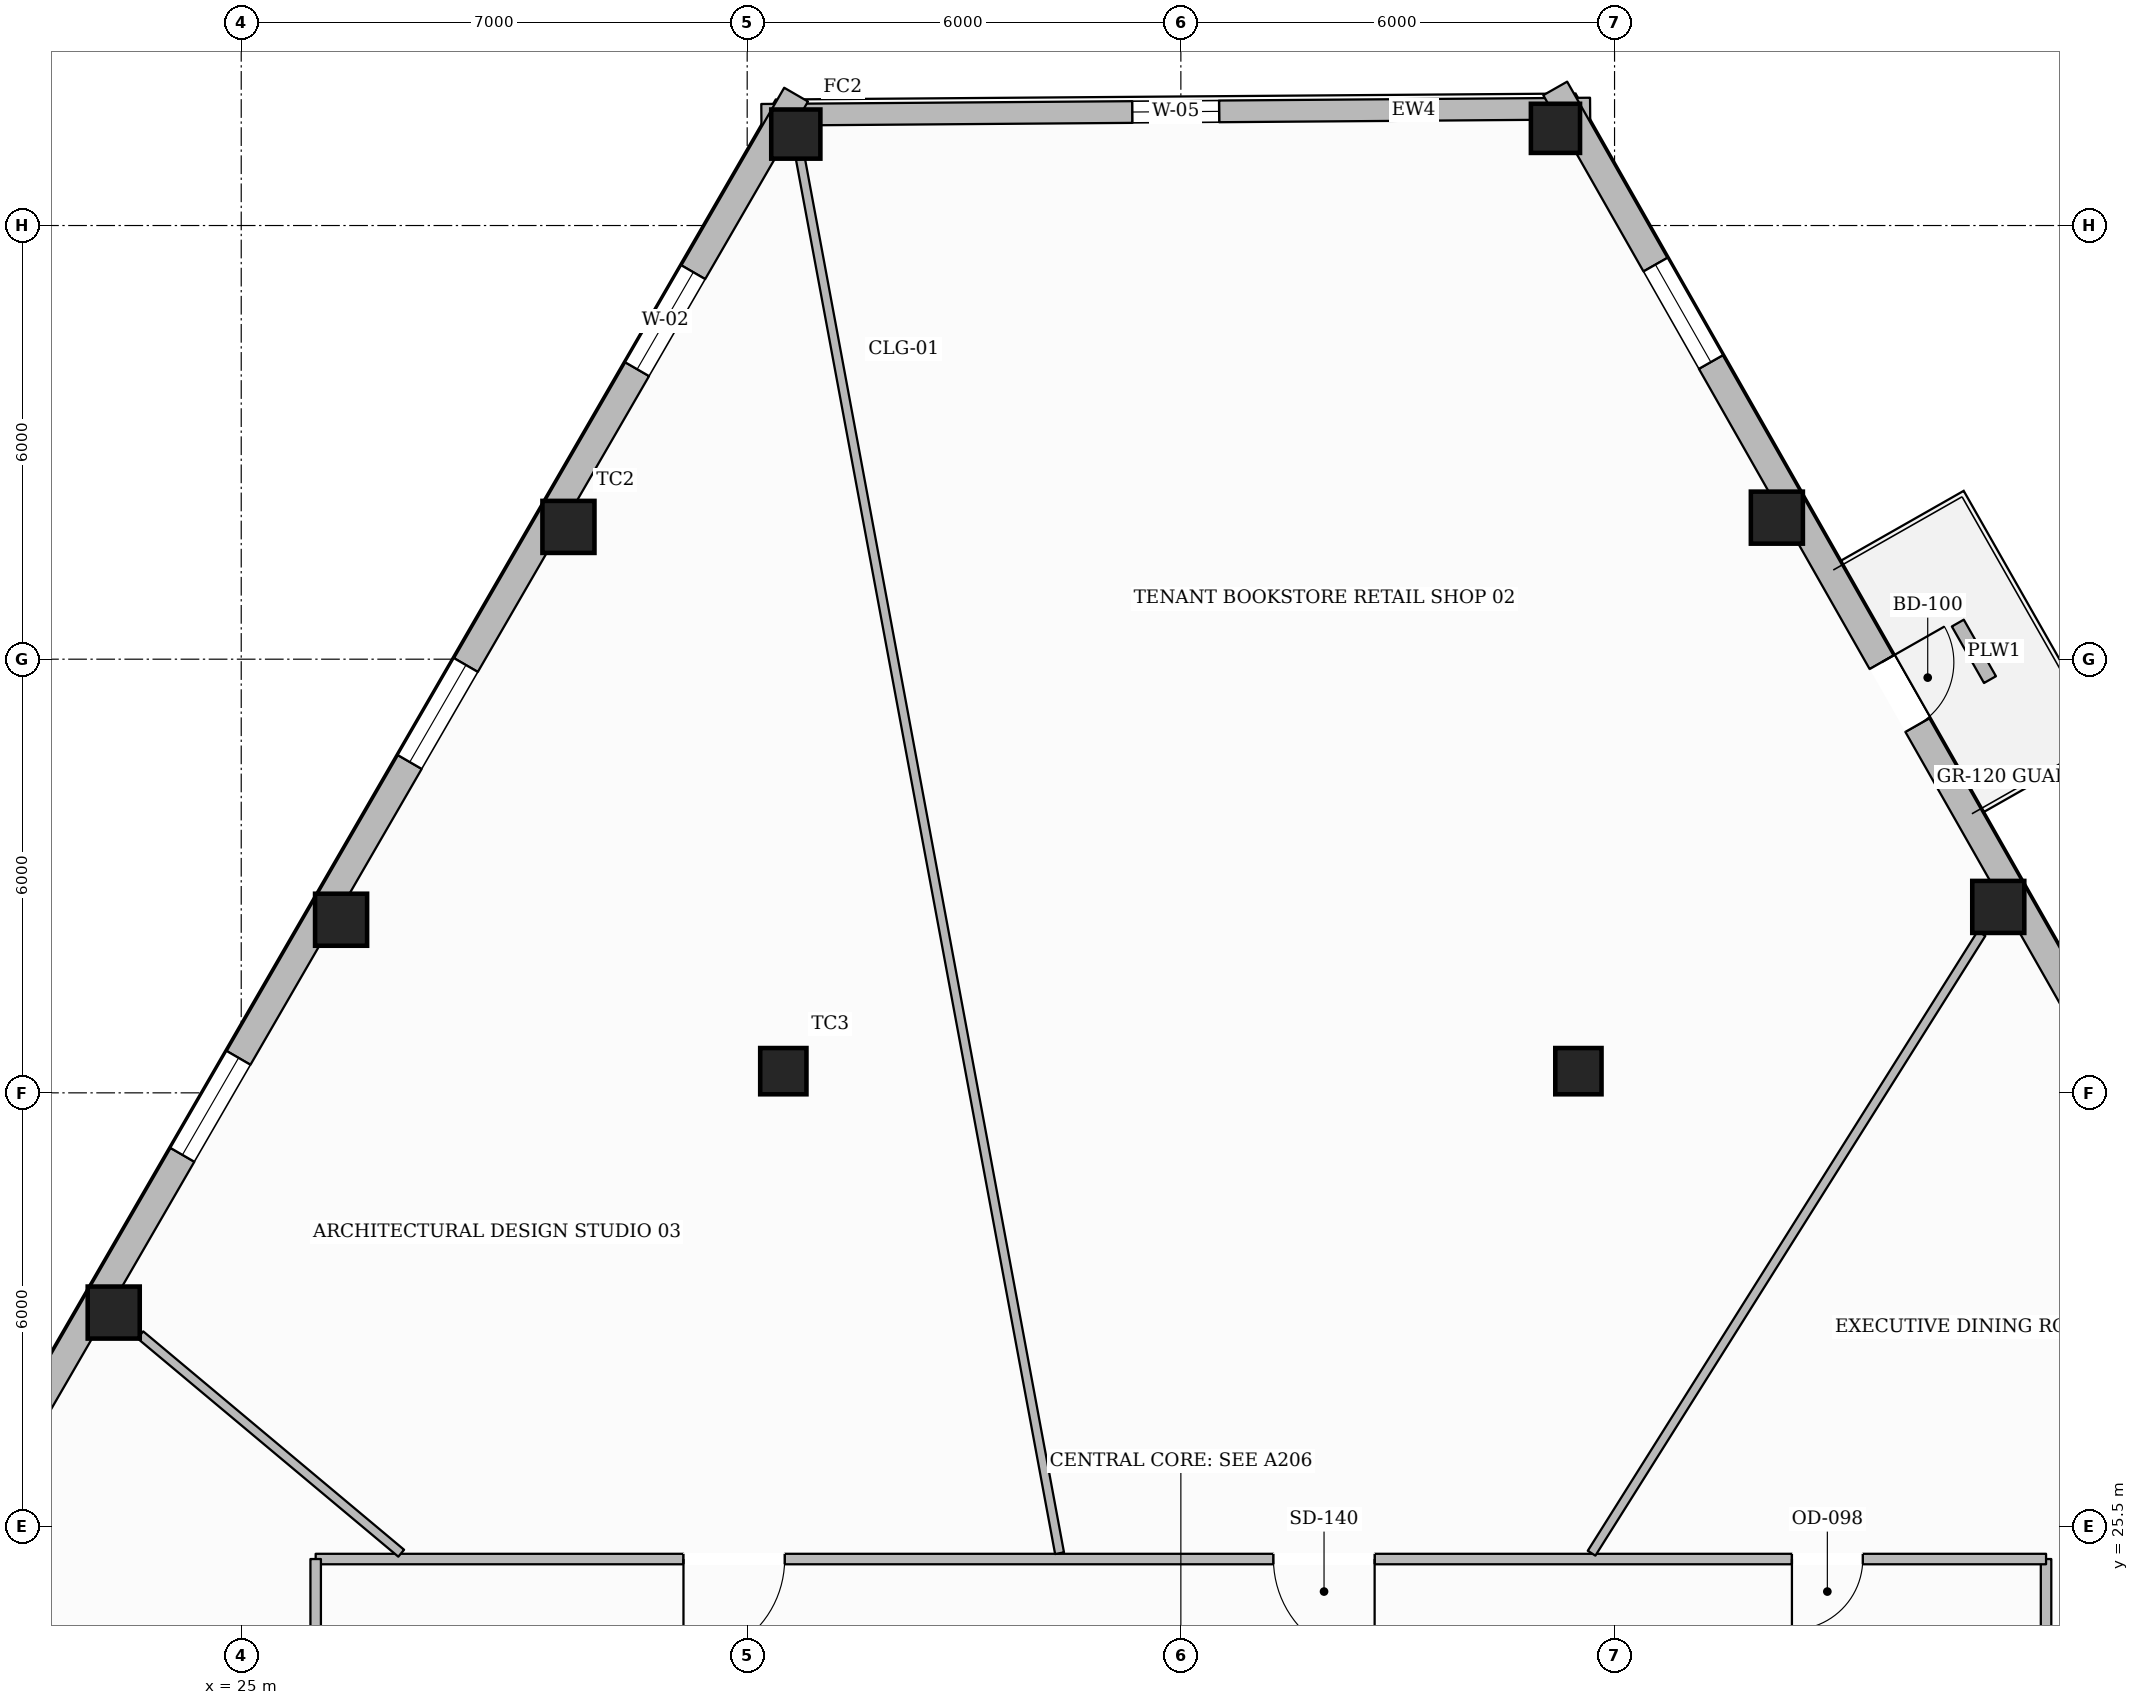
"""IFC4 building model, lengths in metres.
Left out: names, types, materials, properties, quantities, classifications, styles, units other than length and angle.
Written with IfcOpenShell. Run it as: python <this file> out.ifc"""

import sys

from ifc_helpers import new_model, si_unit, direction, frame, frame_2d, origin, origin_2d, place, context, subcontext, project, spatial, rectangle, hollow_rectangle, extrude, element, fill, save


model = new_model("IFC4")
c1 = context("Model", 3, precision=1e-05, world=origin(), true_north=direction((0.0, 1.0)))
c2 = subcontext(c1, "Body", "Model", "MODEL_VIEW")
j1 = project(units=[si_unit("LENGTHUNIT", "METRE"), si_unit("PLANEANGLEUNIT", "RADIAN")], contexts=[c1])
p1 = place(None, origin())
s1 = spatial("IfcSite", under=j1, at=p1, CompositionType="ELEMENT")
p2 = place(p1, origin())
s2 = spatial("IfcBuilding", under=s1, at=p2, CompositionType="ELEMENT")
p3 = place(p2, frame((0.0, 0.0, 150.95)))
s3 = spatial("IfcBuildingStorey", under=s2, at=p3, CompositionType="ELEMENT", Elevation=150.95)
p4 = place(p3, frame((32.673, 44.765, 0.0), z_axis=(0.0, 0.0, 1.0), x_axis=(1.0, 0.0, 0.0)))
e1 = element("IfcColumn", 1, at=p4, inside=s3, PredefinedType="COLUMN", context=c2, shape_type="SweptSolid", body=[
    extrude(hollow_rectangle(XDim=0.68, YDim=0.68, WallThickness=0.03, at=origin_2d()), origin(), (0.0, 0.0, 1.0), 3.43),
])
for number, where, z_axis, x_axis in (
    (2, (29.527, 39.33, 0.0), (0.0, 0.0, 1.0), (1.0, 0.0, 0.0)),
    (3, (26.382, 33.895, 0.0), (0.0, 0.0, 1.0), (1.0, 0.0, 0.0)),
    (4, (23.236, 28.46, 0.0), (0.0, 0.0, 1.0), (1.0, 0.0, 0.0)),
    (5, (49.309, 34.073, 0.0), (0.0, 0.0, 1.0), (1.0, 0.0, 0.0)),
    (6, (46.246, 39.458, 0.0), (0.0, 0.0, 1.0), (1.0, 0.0, 0.0)),
):
    element("IfcColumn", number, at=place(p3, frame(where, z_axis=z_axis, x_axis=x_axis)), inside=s3, PredefinedType="COLUMN", context=c2, shape_type="SweptSolid", body=[
        extrude(hollow_rectangle(XDim=0.72, YDim=0.72, WallThickness=0.032, at=origin_2d()), origin(), (0.0, 0.0, 1.0), 3.43),
    ])
p5 = place(p3, frame((43.183, 44.844, 0.0), z_axis=(0.0, 0.0, 1.0), x_axis=(1.0, 0.0, 0.0)))
e7 = element("IfcColumn", 7, at=p5, inside=s3, PredefinedType="COLUMN", context=c2, shape_type="SweptSolid", body=[
    extrude(hollow_rectangle(XDim=0.68, YDim=0.68, WallThickness=0.03, at=origin_2d()), origin(), (0.0, 0.0, 1.0), 3.43),
])
for number, where, z_axis, x_axis in (
    (8, (32.5, 31.8, 0.0), (0.0, 0.0, 1.0), (1.0, 0.0, 0.0)),
    (9, (43.5, 31.8, 0.0), (0.0, 0.0, 1.0), (1.0, 0.0, 0.0)),
):
    element("IfcColumn", number, at=place(p3, frame(where, z_axis=z_axis, x_axis=x_axis)), inside=s3, PredefinedType="COLUMN", context=c2, shape_type="SweptSolid", body=[
        extrude(hollow_rectangle(XDim=0.64, YDim=0.64, WallThickness=0.028, at=origin_2d()), origin(), (0.0, 0.0, 1.0), 3.43),
    ])
p6 = place(p3, frame((32.196, 45.031, 0.0), z_axis=(0.0, 0.0, 1.0), x_axis=(0.999971432125, 0.007558765403, 0.0)))
e10 = element("IfcWall", 10, at=p6, inside=s3, PredefinedType="STANDARD", context=c2, shape_type="SweptSolid", body=[
    extrude(rectangle(XDim=11.466, YDim=0.3, at=frame_2d((5.733, 0.0))), origin(), (0.0, 0.0, 1.0), 2.889),
])
p7 = place(p6, frame((5.133, 0.0, 0.65)))
e11 = element("IfcOpeningElement", 11, at=p7, cuts=e10, PredefinedType="OPENING", context=c2, shape_type="SweptSolid", body=[
    extrude(rectangle(XDim=1.2, YDim=1.55, at=frame_2d((0.6, 0.775))), frame((0.0, 0.16, 0.0), z_axis=(0.0, -1.0, 0.0), x_axis=(1.0, 0.0, 0.0)), (0.0, 0.0, 1.0), 0.32),
])
p8 = place(p3, frame((13.327, 11.879, 0.0), z_axis=(0.0, 0.0, 1.0), x_axis=(0.500913687278, 0.865497243148, 0.0)))
e12 = element("IfcWall", 12, at=p8, inside=s3, PredefinedType="STANDARD", context=c2, shape_type="SweptSolid", body=[
    extrude(rectangle(XDim=38.628, YDim=0.38, at=frame_2d((19.314, 0.0))), origin(), (0.0, 0.0, 1.0), 2.889),
])
p9 = place(p8, frame((9.257, 0.0, 0.0)))
e13 = element("IfcOpeningElement", 13, at=p9, cuts=e12, PredefinedType="OPENING", context=c2, shape_type="SweptSolid", body=[
    extrude(rectangle(XDim=1.0, YDim=2.2, at=frame_2d((0.5, 1.1))), frame((0.0, 0.2, 0.0), z_axis=(0.0, -1.0, 0.0), x_axis=(1.0, 0.0, 0.0)), (0.0, 0.0, 1.0), 0.4),
])
p10 = place(p8, frame((34.239, 0.0, 0.55)))
e14 = element("IfcOpeningElement", 14, at=p10, cuts=e12, PredefinedType="OPENING", context=c2, shape_type="SweptSolid", body=[
    extrude(rectangle(XDim=1.55, YDim=1.6, at=frame_2d((0.775, 0.8))), frame((0.0, 0.2, 0.0), z_axis=(0.0, -1.0, 0.0), x_axis=(1.0, 0.0, 0.0)), (0.0, 0.0, 1.0), 0.4),
])
p11 = place(p8, frame((27.959, 0.0, 0.55)))
e15 = element("IfcOpeningElement", 15, at=p11, cuts=e12, PredefinedType="OPENING", context=c2, shape_type="SweptSolid", body=[
    extrude(rectangle(XDim=1.55, YDim=1.6, at=frame_2d((0.775, 0.8))), frame((0.0, 0.2, 0.0), z_axis=(0.0, -1.0, 0.0), x_axis=(1.0, 0.0, 0.0)), (0.0, 0.0, 1.0), 0.4),
])
p12 = place(p8, frame((21.679, 0.0, 0.55)))
e16 = element("IfcOpeningElement", 16, at=p12, cuts=e12, PredefinedType="OPENING", context=c2, shape_type="SweptSolid", body=[
    extrude(rectangle(XDim=1.55, YDim=1.6, at=frame_2d((0.775, 0.8))), frame((0.0, 0.2, 0.0), z_axis=(0.0, -1.0, 0.0), x_axis=(1.0, 0.0, 0.0)), (0.0, 0.0, 1.0), 0.4),
])
p13 = place(p8, frame((2.84, 0.0, 0.55)))
e17 = element("IfcOpeningElement", 17, at=p13, cuts=e12, PredefinedType="OPENING", context=c2, shape_type="SweptSolid", body=[
    extrude(rectangle(XDim=1.55, YDim=1.6, at=frame_2d((0.775, 0.8))), frame((0.0, 0.2, 0.0), z_axis=(0.0, -1.0, 0.0), x_axis=(1.0, 0.0, 0.0)), (0.0, 0.0, 1.0), 0.4),
])
p14 = place(p3, frame((43.179, 45.396, 0.0), z_axis=(0.0, 0.0, 1.0), x_axis=(0.494363218784, -0.869255433065, 0.0)))
e18 = element("IfcWall", 18, at=p14, inside=s3, PredefinedType="STANDARD", context=c2, shape_type="SweptSolid", body=[
    extrude(rectangle(XDim=38.134, YDim=0.38, at=frame_2d((19.067, 0.0))), origin(), (0.0, 0.0, 1.0), 2.889),
])
p15 = place(p14, frame((9.134, 0.0, 0.0)))
e19 = element("IfcOpeningElement", 19, at=p15, cuts=e18, PredefinedType="OPENING", context=c2, shape_type="SweptSolid", body=[
    extrude(rectangle(XDim=1.0, YDim=2.2, at=frame_2d((0.5, 1.1))), frame((0.0, 0.2, 0.0), z_axis=(0.0, -1.0, 0.0), x_axis=(1.0, 0.0, 0.0)), (0.0, 0.0, 1.0), 0.4),
])
p16 = place(p14, frame((33.785, 0.0, 0.55)))
e20 = element("IfcOpeningElement", 20, at=p16, cuts=e18, PredefinedType="OPENING", context=c2, shape_type="SweptSolid", body=[
    extrude(rectangle(XDim=1.55, YDim=1.6, at=frame_2d((0.775, 0.8))), frame((0.0, 0.2, 0.0), z_axis=(0.0, -1.0, 0.0), x_axis=(1.0, 0.0, 0.0)), (0.0, 0.0, 1.0), 0.4),
])
p17 = place(p14, frame((27.589, 0.0, 0.55)))
e21 = element("IfcOpeningElement", 21, at=p17, cuts=e18, PredefinedType="OPENING", context=c2, shape_type="SweptSolid", body=[
    extrude(rectangle(XDim=1.55, YDim=1.6, at=frame_2d((0.775, 0.8))), frame((0.0, 0.2, 0.0), z_axis=(0.0, -1.0, 0.0), x_axis=(1.0, 0.0, 0.0)), (0.0, 0.0, 1.0), 0.4),
])
p18 = place(p14, frame((21.393, 0.0, 0.55)))
e22 = element("IfcOpeningElement", 22, at=p18, cuts=e18, PredefinedType="OPENING", context=c2, shape_type="SweptSolid", body=[
    extrude(rectangle(XDim=1.55, YDim=1.6, at=frame_2d((0.775, 0.8))), frame((0.0, 0.2, 0.0), z_axis=(0.0, -1.0, 0.0), x_axis=(1.0, 0.0, 0.0)), (0.0, 0.0, 1.0), 0.4),
])
p19 = place(p14, frame((2.805, 0.0, 0.55)))
e23 = element("IfcOpeningElement", 23, at=p19, cuts=e18, PredefinedType="OPENING", context=c2, shape_type="SweptSolid", body=[
    extrude(rectangle(XDim=1.55, YDim=1.6, at=frame_2d((0.775, 0.8))), frame((0.0, 0.2, 0.0), z_axis=(0.0, -1.0, 0.0), x_axis=(1.0, 0.0, 0.0)), (0.0, 0.0, 1.0), 0.4),
])
p20 = place(p3, frame((49.194, 37.217, 0.0), z_axis=(0.0, 0.0, 1.0), x_axis=(-0.494209783785, 0.869342676746, 0.0)))
e24 = element("IfcWall", 24, at=p20, inside=s3, PredefinedType="USERDEFINED", context=c2, shape_type="SweptSolid", body=[
    extrude(rectangle(XDim=0.9, YDim=0.19, at=frame_2d((0.45, 0.0))), origin(), (0.0, 0.0, 1.0), 0.5),
])
p21 = place(p3, frame((49.97, 7.15, 0.0), z_axis=(0.0, 0.0, 1.0), x_axis=(0.0, 1.0, 0.0)))
e25 = element("IfcWall", 25, at=p21, inside=s3, PredefinedType="PARTITIONING", context=c2, shape_type="SweptSolid", body=[
    extrude(rectangle(XDim=17.9, YDim=0.145, at=frame_2d((8.95, 0.0))), origin(), (0.0, 0.0, 1.0), 3.118),
])
p22 = place(p21, frame((8.246, 0.0, 0.0)))
e26 = element("IfcOpeningElement", 26, at=p22, cuts=e25, PredefinedType="OPENING", context=c2, shape_type="SweptSolid", body=[
    extrude(rectangle(XDim=1.02, YDim=2.15, at=frame_2d((0.51, 1.075))), frame((0.0, 0.083, 0.0), z_axis=(0.0, -1.0, 0.0), x_axis=(1.0, 0.0, 0.0)), (0.0, 0.0, 1.0), 0.165),
])
p23 = place(p3, frame((49.97, 25.05, 0.0), z_axis=(0.0, 0.0, 1.0), x_axis=(-1.0, 0.0, 0.0)))
e27 = element("IfcWall", 27, at=p23, inside=s3, PredefinedType="PARTITIONING", context=c2, shape_type="SweptSolid", body=[
    extrude(rectangle(XDim=23.94, YDim=0.145, at=frame_2d((11.97, 0.0))), origin(), (0.0, 0.0, 1.0), 3.43),
])
p24 = place(p23, frame((2.536, 0.0, 0.0)))
e28 = element("IfcOpeningElement", 28, at=p24, cuts=e27, PredefinedType="OPENING", context=c2, shape_type="SweptSolid", body=[
    extrude(rectangle(XDim=0.98, YDim=2.15, at=frame_2d((0.49, 1.075))), frame((0.0, 0.083, 0.0), z_axis=(0.0, -1.0, 0.0), x_axis=(1.0, 0.0, 0.0)), (0.0, 0.0, 1.0), 0.165),
])
p25 = place(p23, frame((9.289, 0.0, 0.0)))
e29 = element("IfcOpeningElement", 29, at=p25, cuts=e27, PredefinedType="OPENING", context=c2, shape_type="SweptSolid", body=[
    extrude(rectangle(XDim=1.4, YDim=2.2, at=frame_2d((0.7, 1.1))), frame((0.0, 0.083, 0.0), z_axis=(0.0, -1.0, 0.0), x_axis=(1.0, 0.0, 0.0)), (0.0, 0.0, 1.0), 0.165),
])
p26 = place(p23, frame((17.451, 0.0, 0.0)))
e30 = element("IfcOpeningElement", 30, at=p26, cuts=e27, PredefinedType="OPENING", context=c2, shape_type="SweptSolid", body=[
    extrude(rectangle(XDim=1.4, YDim=2.2, at=frame_2d((0.7, 1.1))), frame((0.0, 0.083, 0.0), z_axis=(0.0, -1.0, 0.0), x_axis=(1.0, 0.0, 0.0)), (0.0, 0.0, 1.0), 0.165),
])
p27 = place(p3, frame((26.03, 25.05, 0.0), z_axis=(0.0, 0.0, 1.0), x_axis=(0.0, -1.0, 0.0)))
e31 = element("IfcWall", 31, at=p27, inside=s3, PredefinedType="PARTITIONING", context=c2, shape_type="SweptSolid", body=[
    extrude(rectangle(XDim=17.9, YDim=0.145, at=frame_2d((8.95, 0.0))), origin(), (0.0, 0.0, 1.0), 3.118),
])
p28 = place(p27, frame((3.644, 0.0, 0.0)))
e32 = element("IfcOpeningElement", 32, at=p28, cuts=e31, PredefinedType="OPENING", context=c2, shape_type="SweptSolid", body=[
    extrude(rectangle(XDim=0.98, YDim=2.15, at=frame_2d((0.49, 1.075))), frame((0.0, 0.083, 0.0), z_axis=(0.0, -1.0, 0.0), x_axis=(1.0, 0.0, 0.0)), (0.0, 0.0, 1.0), 0.165),
])
p29 = place(p27, frame((11.936, 0.0, 0.0)))
e33 = element("IfcOpeningElement", 33, at=p29, cuts=e31, PredefinedType="OPENING", context=c2, shape_type="SweptSolid", body=[
    extrude(rectangle(XDim=1.4, YDim=2.2, at=frame_2d((0.7, 1.1))), frame((0.0, 0.083, 0.0), z_axis=(0.0, -1.0, 0.0), x_axis=(1.0, 0.0, 0.0)), (0.0, 0.0, 1.0), 0.165),
])
p30 = place(p3, frame((43.682, 25.131, 0.0), z_axis=(0.0, 0.0, 1.0), x_axis=(0.53258313075, 0.846377698691, 0.0)))
e34 = element("IfcWall", 34, at=p30, inside=s3, PredefinedType="PARTITIONING", context=c2, shape_type="SweptSolid", body=[
    extrude(rectangle(XDim=10.13, YDim=0.125, at=frame_2d((5.065, 0.0))), origin(), (0.0, 0.0, 1.0), 3.43),
])
p31 = place(p3, frame((36.322, 25.131, 0.0), z_axis=(0.0, 0.0, 1.0), x_axis=(-0.182723840281, 0.983164278335, 0.0)))
e35 = element("IfcWall", 35, at=p31, inside=s3, PredefinedType="PARTITIONING", context=c2, shape_type="SweptSolid", body=[
    extrude(rectangle(XDim=19.617, YDim=0.125, at=frame_2d((9.809, 0.0))), origin(), (0.0, 0.0, 1.0), 2.971),
])
p32 = place(p3, frame((27.213, 25.131, 0.0), z_axis=(0.0, 0.0, 1.0), x_axis=(-0.766769547329, 0.641922472958, 0.0)))
e36 = element("IfcWall", 36, at=p32, inside=s3, PredefinedType="PARTITIONING", context=c2, shape_type="SweptSolid", body=[
    extrude(rectangle(XDim=4.707, YDim=0.125, at=frame_2d((2.354, 0.0))), origin(), (0.0, 0.0, 1.0), 2.971),
])
p33 = place(p15, origin())
e37 = element("IfcDoor", 37, at=p33, inside=s3, OperationType="SINGLE_SWING_LEFT", PredefinedType="DOOR", context=c2, shape_type="SweptSolid", body=[
    extrude(rectangle(XDim=1.0, YDim=2.2, at=frame_2d((0.5, 1.1))), frame((0.0, 0.025, 0.0), z_axis=(0.0, -1.0, 0.0), x_axis=(1.0, 0.0, 0.0)), (0.0, 0.0, 1.0), 0.05),
])
fill(e19, e37)
p34 = place(p10, origin())
e38 = element("IfcWindow", 38, at=p34, inside=s3, PartitioningType="SINGLE_PANEL", PredefinedType="WINDOW", context=c2, shape_type="SweptSolid", body=[
    extrude(rectangle(XDim=1.55, YDim=1.6, at=frame_2d((0.775, 0.8))), frame((0.0, 0.03, 0.0), z_axis=(0.0, -1.0, 0.0), x_axis=(1.0, 0.0, 0.0)), (0.0, 0.0, 1.0), 0.06),
])
fill(e14, e38)
p35 = place(p11, origin())
e39 = element("IfcWindow", 39, at=p35, inside=s3, PartitioningType="SINGLE_PANEL", PredefinedType="WINDOW", context=c2, shape_type="SweptSolid", body=[
    extrude(rectangle(XDim=1.55, YDim=1.6, at=frame_2d((0.775, 0.8))), frame((0.0, 0.03, 0.0), z_axis=(0.0, -1.0, 0.0), x_axis=(1.0, 0.0, 0.0)), (0.0, 0.0, 1.0), 0.06),
])
fill(e15, e39)
p36 = place(p12, origin())
e40 = element("IfcWindow", 40, at=p36, inside=s3, PartitioningType="SINGLE_PANEL", PredefinedType="WINDOW", context=c2, shape_type="SweptSolid", body=[
    extrude(rectangle(XDim=1.55, YDim=1.6, at=frame_2d((0.775, 0.8))), frame((0.0, 0.03, 0.0), z_axis=(0.0, -1.0, 0.0), x_axis=(1.0, 0.0, 0.0)), (0.0, 0.0, 1.0), 0.06),
])
fill(e16, e40)
p37 = place(p19, origin())
e41 = element("IfcWindow", 41, at=p37, inside=s3, PartitioningType="SINGLE_PANEL", PredefinedType="WINDOW", context=c2, shape_type="SweptSolid", body=[
    extrude(rectangle(XDim=1.55, YDim=1.6, at=frame_2d((0.775, 0.8))), frame((0.0, 0.03, 0.0), z_axis=(0.0, -1.0, 0.0), x_axis=(1.0, 0.0, 0.0)), (0.0, 0.0, 1.0), 0.06),
])
fill(e23, e41)
p38 = place(p7, origin())
e42 = element("IfcWindow", 42, at=p38, inside=s3, PartitioningType="SINGLE_PANEL", PredefinedType="WINDOW", context=c2, shape_type="SweptSolid", body=[
    extrude(rectangle(XDim=1.2, YDim=1.55, at=frame_2d((0.6, 0.775))), frame((0.0, 0.03, 0.0), z_axis=(0.0, -1.0, 0.0), x_axis=(1.0, 0.0, 0.0)), (0.0, 0.0, 1.0), 0.06),
])
fill(e11, e42)
p39 = place(p24, origin())
e43 = element("IfcDoor", 43, at=p39, inside=s3, OperationType="SINGLE_SWING_RIGHT", PredefinedType="DOOR", context=c2, shape_type="SweptSolid", body=[
    extrude(rectangle(XDim=0.98, YDim=2.15, at=frame_2d((0.49, 1.075))), frame((0.0, 0.025, 0.0), z_axis=(0.0, -1.0, 0.0), x_axis=(1.0, 0.0, 0.0)), (0.0, 0.0, 1.0), 0.05),
])
fill(e28, e43)
p40 = place(p25, origin())
e44 = element("IfcDoor", 44, at=p40, inside=s3, OperationType="SINGLE_SWING_LEFT", PredefinedType="DOOR", context=c2, shape_type="SweptSolid", body=[
    extrude(rectangle(XDim=1.4, YDim=2.2, at=frame_2d((0.7, 1.1))), frame((0.0, 0.025, 0.0), z_axis=(0.0, -1.0, 0.0), x_axis=(1.0, 0.0, 0.0)), (0.0, 0.0, 1.0), 0.05),
])
fill(e29, e44)
p41 = place(p26, origin())
e45 = element("IfcDoor", 45, at=p41, inside=s3, OperationType="SINGLE_SWING_RIGHT", PredefinedType="DOOR", context=c2, shape_type="SweptSolid", body=[
    extrude(rectangle(XDim=1.4, YDim=2.2, at=frame_2d((0.7, 1.1))), frame((0.0, 0.025, 0.0), z_axis=(0.0, -1.0, 0.0), x_axis=(1.0, 0.0, 0.0)), (0.0, 0.0, 1.0), 0.05),
])
fill(e30, e45)
save(model, sys.argv[1])
